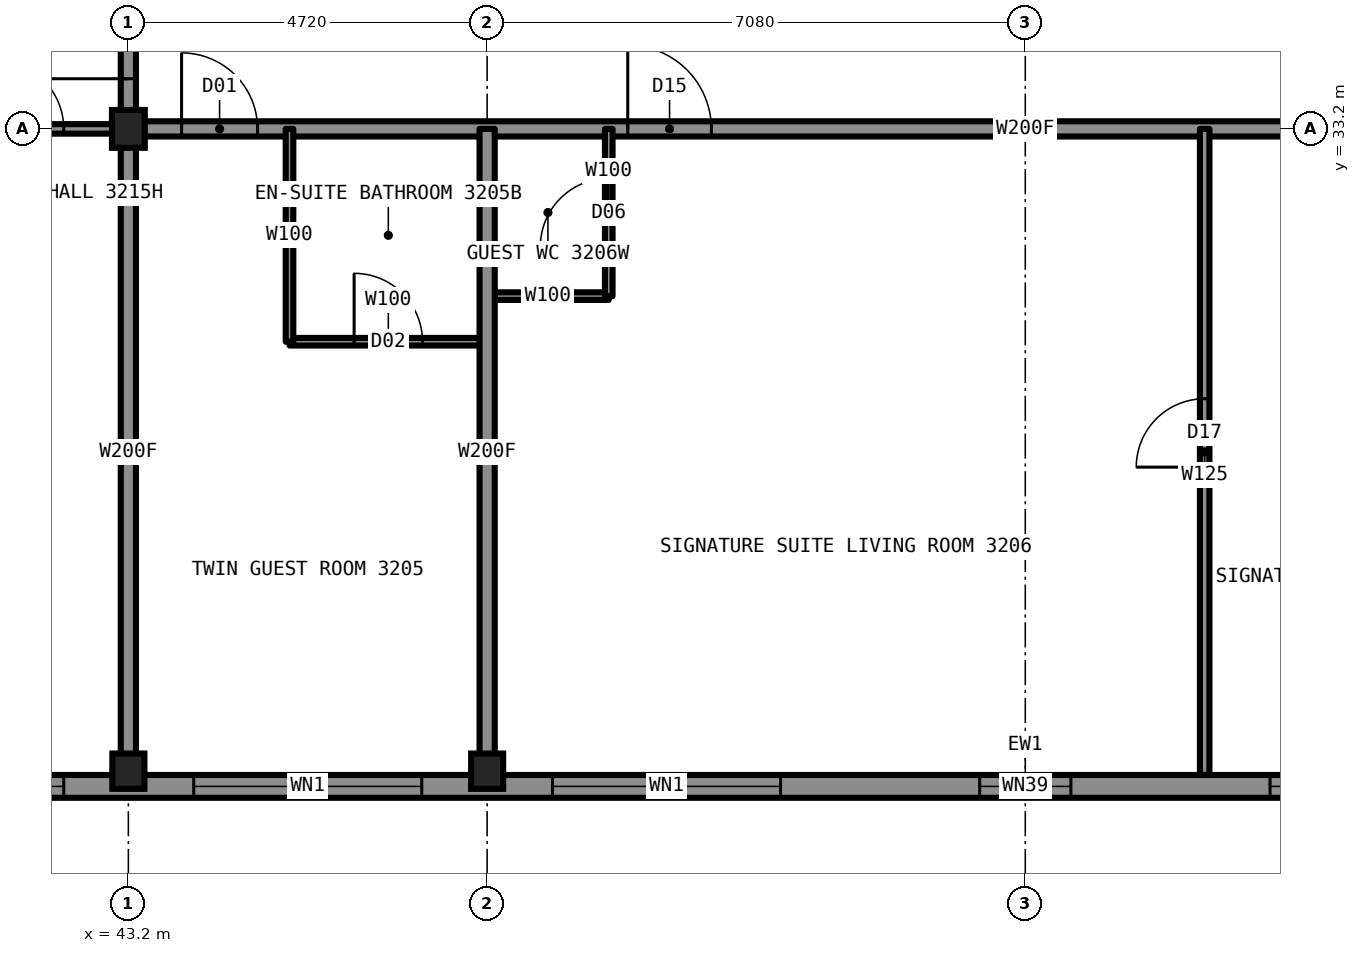
"""IFC4 building model, lengths in metres.
Left out: names, types, materials, properties, quantities, classifications, styles, units other than length and angle.
Written with IfcOpenShell. Run it as: python <this file> out.ifc"""

import sys

from ifc_helpers import new_model, si_unit, direction, frame, frame_2d, origin, origin_2d, place, context, subcontext, project, spatial, rectangle, i_section, extrude, element, fill, save


model = new_model("IFC4")
c1 = context("Model", 3, precision=1e-05, world=origin(), true_north=direction((0.0, 1.0)))
c2 = subcontext(c1, "Body", "Model", "MODEL_VIEW")
j1 = project(units=[si_unit("LENGTHUNIT", "METRE"), si_unit("PLANEANGLEUNIT", "RADIAN")], contexts=[c1])
p1 = place(None, origin())
s1 = spatial("IfcSite", under=j1, at=p1, CompositionType="ELEMENT")
p2 = place(p1, origin())
s2 = spatial("IfcBuilding", under=s1, at=p2, CompositionType="ELEMENT")
p3 = place(p2, frame((0.0, 0.0, 114.4)))
s3 = spatial("IfcBuildingStorey", under=s2, at=p3, CompositionType="ELEMENT", Elevation=114.4)
for number, where, z_axis, x_axis in (
    (1, (43.2, 24.75, 0.0), (0.0, 0.0, 1.0), (1.0, 0.0, 0.0)),
    (2, (47.92, 24.75, 0.0), (0.0, 0.0, 1.0), (1.0, 0.0, 0.0)),
):
    element("IfcColumn", number, at=place(p3, frame(where, z_axis=z_axis, x_axis=x_axis)), inside=s3, PredefinedType="COLUMN", context=c2, shape_type="SweptSolid", body=[
        extrude(i_section(OverallWidth=0.422, OverallDepth=0.465, WebThickness=0.045, FlangeThickness=0.073, at=origin_2d()), origin(), (0.0, 0.0, 1.0), 3.5),
    ])
p4 = place(p3, frame((43.2, 33.2, 0.0), z_axis=(0.0, 0.0, 1.0), x_axis=(1.0, 0.0, 0.0)))
e3 = element("IfcColumn", 3, at=p4, inside=s3, PredefinedType="COLUMN", context=c2, shape_type="SweptSolid", body=[
    extrude(i_section(OverallWidth=0.432, OverallDepth=0.498, WebThickness=0.056, FlangeThickness=0.089, at=origin_2d()), origin(), (0.0, 0.0, 1.0), 3.5),
])
p5 = place(p3, frame((43.2, 33.2, 0.0), z_axis=(0.0, 0.0, 1.0), x_axis=(1.0, 0.0, 0.0)))
e4 = element("IfcWall", 4, at=p5, inside=s3, PredefinedType="PARTITIONING", context=c2, shape_type="SweptSolid", body=[
    extrude(rectangle(XDim=23.6, YDim=0.2, at=frame_2d((11.8, 0.0))), origin(), (0.0, 0.0, 1.0), 3.33),
])
p6 = place(p5, frame((0.7, 0.0, 0.0)))
e5 = element("IfcOpeningElement", 5, at=p6, cuts=e4, PredefinedType="OPENING", context=c2, shape_type="SweptSolid", body=[
    extrude(rectangle(XDim=1.0, YDim=2.2, at=frame_2d((0.5, 1.1))), frame((0.0, 0.11, 0.0), z_axis=(0.0, -1.0, 0.0), x_axis=(1.0, 0.0, 0.0)), (0.0, 0.0, 1.0), 0.22),
])
p7 = place(p5, frame((6.57, 0.0, 0.0)))
e6 = element("IfcOpeningElement", 6, at=p7, cuts=e4, PredefinedType="OPENING", context=c2, shape_type="SweptSolid", body=[
    extrude(rectangle(XDim=1.1, YDim=2.2, at=frame_2d((0.55, 1.1))), frame((0.0, 0.11, 0.0), z_axis=(0.0, -1.0, 0.0), x_axis=(1.0, 0.0, 0.0)), (0.0, 0.0, 1.0), 0.22),
])
p8 = place(p5, frame((20.34, 0.0, 0.0)))
e7 = element("IfcOpeningElement", 7, at=p8, cuts=e4, PredefinedType="OPENING", context=c2, shape_type="SweptSolid", body=[
    extrude(rectangle(XDim=1.0, YDim=2.2, at=frame_2d((0.5, 1.1))), frame((0.0, 0.11, 0.0), z_axis=(0.0, -1.0, 0.0), x_axis=(1.0, 0.0, 0.0)), (0.0, 0.0, 1.0), 0.22),
])
p9 = place(p3, frame((34.7, 33.2, 0.0), z_axis=(0.0, 0.0, 1.0), x_axis=(1.0, 0.0, 0.0)))
e8 = element("IfcWall", 8, at=p9, inside=s3, PredefinedType="PARTITIONING", context=c2, shape_type="SweptSolid", body=[
    extrude(rectangle(XDim=8.5, YDim=0.125, at=frame_2d((4.25, 0.0))), origin(), (0.0, 0.0, 1.0), 2.573),
])
p10 = place(p9, frame((6.75, 0.0, 0.0)))
e9 = element("IfcOpeningElement", 9, at=p10, cuts=e8, PredefinedType="OPENING", context=c2, shape_type="SweptSolid", body=[
    extrude(rectangle(XDim=0.9, YDim=2.2, at=frame_2d((0.45, 1.1))), frame((0.0, 0.073, 0.0), z_axis=(0.0, -1.0, 0.0), x_axis=(1.0, 0.0, 0.0)), (0.0, 0.0, 1.0), 0.145),
])
p11 = place(p3, frame((47.92, 31.0, 0.0), z_axis=(0.0, 0.0, 1.0), x_axis=(1.0, 0.0, 0.0)))
e10 = element("IfcWall", 10, at=p11, inside=s3, PredefinedType="PARTITIONING", context=c2, shape_type="SweptSolid", body=[
    extrude(rectangle(XDim=1.6, YDim=0.1, at=frame_2d((0.8, 0.0))), origin(), (0.0, 0.0, 1.0), 3.33),
])
p12 = place(p3, frame((45.32, 30.4, 0.0), z_axis=(0.0, 0.0, 1.0), x_axis=(1.0, 0.0, 0.0)))
e11 = element("IfcWall", 11, at=p12, inside=s3, PredefinedType="PARTITIONING", context=c2, shape_type="SweptSolid", body=[
    extrude(rectangle(XDim=2.6, YDim=0.1, at=frame_2d((1.3, 0.0))), origin(), (0.0, 0.0, 1.0), 3.33),
])
p13 = place(p12, frame((0.85, 0.0, 0.0)))
e12 = element("IfcOpeningElement", 12, at=p13, cuts=e11, PredefinedType="OPENING", context=c2, shape_type="SweptSolid", body=[
    extrude(rectangle(XDim=0.9, YDim=2.1, at=frame_2d((0.45, 1.05))), frame((0.0, 0.06, 0.0), z_axis=(0.0, -1.0, 0.0), x_axis=(1.0, 0.0, 0.0)), (0.0, 0.0, 1.0), 0.12),
])
p14 = place(p3, frame((43.2, 33.2, 0.0), z_axis=(0.0, 0.0, 1.0), x_axis=(0.0, 1.0, 0.0)))
e13 = element("IfcWall", 13, at=p14, inside=s3, PredefinedType="PARTITIONING", context=c2, shape_type="SweptSolid", body=[
    extrude(rectangle(XDim=4.72, YDim=0.2, at=frame_2d((2.36, 0.0))), origin(), (0.0, 0.0, 1.0), 3.33),
])
p15 = place(p14, frame((0.66, 0.0, 0.0)))
e14 = element("IfcOpeningElement", 14, at=p15, cuts=e13, PredefinedType="OPENING", context=c2, shape_type="SweptSolid", body=[
    extrude(rectangle(XDim=1.1, YDim=2.2, at=frame_2d((0.55, 1.1))), frame((0.0, 0.11, 0.0), z_axis=(0.0, -1.0, 0.0), x_axis=(1.0, 0.0, 0.0)), (0.0, 0.0, 1.0), 0.22),
])
p16 = place(p3, frame((43.2, 24.7, 0.0), z_axis=(0.0, 0.0, 1.0), x_axis=(0.0, 1.0, 0.0)))
e15 = element("IfcWall", 15, at=p16, inside=s3, PredefinedType="PARTITIONING", context=c2, shape_type="SweptSolid", body=[
    extrude(rectangle(XDim=8.5, YDim=0.2, at=frame_2d((4.25, 0.0))), origin(), (0.0, 0.0, 1.0), 2.573),
])
p17 = place(p3, frame((49.52, 31.0, 0.0), z_axis=(0.0, 0.0, 1.0), x_axis=(0.0, 1.0, 0.0)))
e16 = element("IfcWall", 16, at=p17, inside=s3, PredefinedType="PARTITIONING", context=c2, shape_type="SweptSolid", body=[
    extrude(rectangle(XDim=2.2, YDim=0.1, at=frame_2d((1.1, 0.0))), origin(), (0.0, 0.0, 1.0), 3.33),
])
p18 = place(p17, frame((0.65, 0.0, 0.0)))
e17 = element("IfcOpeningElement", 17, at=p18, cuts=e16, PredefinedType="OPENING", context=c2, shape_type="SweptSolid", body=[
    extrude(rectangle(XDim=0.9, YDim=2.1, at=frame_2d((0.45, 1.05))), frame((0.0, 0.06, 0.0), z_axis=(0.0, -1.0, 0.0), x_axis=(1.0, 0.0, 0.0)), (0.0, 0.0, 1.0), 0.12),
])
p19 = place(p3, frame((47.92, 24.7, 0.0), z_axis=(0.0, 0.0, 1.0), x_axis=(0.0, 1.0, 0.0)))
e18 = element("IfcWall", 18, at=p19, inside=s3, PredefinedType="PARTITIONING", context=c2, shape_type="SweptSolid", body=[
    extrude(rectangle(XDim=8.5, YDim=0.2, at=frame_2d((4.25, 0.0))), origin(), (0.0, 0.0, 1.0), 2.573),
])
p20 = place(p3, frame((45.32, 30.4, 0.0), z_axis=(0.0, 0.0, 1.0), x_axis=(0.0, 1.0, 0.0)))
e19 = element("IfcWall", 19, at=p20, inside=s3, PredefinedType="PARTITIONING", context=c2, shape_type="SweptSolid", body=[
    extrude(rectangle(XDim=2.8, YDim=0.1, at=frame_2d((1.4, 0.0))), origin(), (0.0, 0.0, 1.0), 3.33),
])
p21 = place(p3, frame((57.36, 24.7, 0.0), z_axis=(0.0, 0.0, 1.0), x_axis=(0.0, 1.0, 0.0)))
e20 = element("IfcWall", 20, at=p21, inside=s3, PredefinedType="PARTITIONING", context=c2, shape_type="SweptSolid", body=[
    extrude(rectangle(XDim=8.5, YDim=0.125, at=frame_2d((4.25, 0.0))), origin(), (0.0, 0.0, 1.0), 3.33),
])
p22 = place(p21, frame((4.05, 0.0, 0.0)))
e21 = element("IfcOpeningElement", 21, at=p22, cuts=e20, PredefinedType="OPENING", context=c2, shape_type="SweptSolid", body=[
    extrude(rectangle(XDim=0.9, YDim=2.2, at=frame_2d((0.45, 1.1))), frame((0.0, 0.073, 0.0), z_axis=(0.0, -1.0, 0.0), x_axis=(1.0, 0.0, 0.0)), (0.0, 0.0, 1.0), 0.145),
])
p23 = place(p3, frame((39.9, 24.55, 0.0), z_axis=(0.0, 0.0, 1.0), x_axis=(1.0, 0.0, 0.0)))
e22 = element("IfcWall", 22, at=p23, inside=s3, PredefinedType="SOLIDWALL", context=c2, shape_type="SweptSolid", body=[
    extrude(rectangle(XDim=30.2, YDim=0.3, at=frame_2d((15.1, 0.0))), origin(), (0.0, 0.0, 1.0), 2.83),
])
p24 = place(p23, frame((0.85, 0.0, 0.5)))
e23 = element("IfcOpeningElement", 23, at=p24, cuts=e22, PredefinedType="OPENING", context=c2, shape_type="SweptSolid", body=[
    extrude(rectangle(XDim=1.6, YDim=2.0, at=frame_2d((0.8, 1.0))), frame((0.0, 0.16, 0.0), z_axis=(0.0, -1.0, 0.0), x_axis=(1.0, 0.0, 0.0)), (0.0, 0.0, 1.0), 0.32),
])
p25 = place(p23, frame((4.16, 0.0, 0.5)))
e24 = element("IfcOpeningElement", 24, at=p25, cuts=e22, PredefinedType="OPENING", context=c2, shape_type="SweptSolid", body=[
    extrude(rectangle(XDim=3.0, YDim=2.0, at=frame_2d((1.5, 1.0))), frame((0.0, 0.16, 0.0), z_axis=(0.0, -1.0, 0.0), x_axis=(1.0, 0.0, 0.0)), (0.0, 0.0, 1.0), 0.32),
])
p26 = place(p23, frame((10.53, 0.0, 0.5)))
e25 = element("IfcOpeningElement", 25, at=p26, cuts=e22, PredefinedType="OPENING", context=c2, shape_type="SweptSolid", body=[
    extrude(rectangle(XDim=1.3, YDim=1.9, at=frame_2d((0.65, 0.95))), frame((0.0, 0.16, 0.0), z_axis=(0.0, -1.0, 0.0), x_axis=(1.0, 0.0, 0.0)), (0.0, 0.0, 1.0), 0.32),
])
p27 = place(p23, frame((13.6, 0.0, 0.5)))
e26 = element("IfcOpeningElement", 26, at=p27, cuts=e22, PredefinedType="OPENING", context=c2, shape_type="SweptSolid", body=[
    extrude(rectangle(XDim=3.0, YDim=2.0, at=frame_2d((1.5, 1.0))), frame((0.0, 0.16, 0.0), z_axis=(0.0, -1.0, 0.0), x_axis=(1.0, 0.0, 0.0)), (0.0, 0.0, 1.0), 0.32),
])
p28 = place(p23, frame((18.32, 0.0, 0.5)))
e27 = element("IfcOpeningElement", 27, at=p28, cuts=e22, PredefinedType="OPENING", context=c2, shape_type="SweptSolid", body=[
    extrude(rectangle(XDim=1.3, YDim=1.9, at=frame_2d((0.65, 0.95))), frame((0.0, 0.16, 0.0), z_axis=(0.0, -1.0, 0.0), x_axis=(1.0, 0.0, 0.0)), (0.0, 0.0, 1.0), 0.32),
])
p29 = place(p23, frame((23.04, 0.0, 0.5)))
e28 = element("IfcOpeningElement", 28, at=p29, cuts=e22, PredefinedType="OPENING", context=c2, shape_type="SweptSolid", body=[
    extrude(rectangle(XDim=3.0, YDim=2.0, at=frame_2d((1.5, 1.0))), frame((0.0, 0.16, 0.0), z_axis=(0.0, -1.0, 0.0), x_axis=(1.0, 0.0, 0.0)), (0.0, 0.0, 1.0), 0.32),
])
p30 = place(p23, frame((27.75, 0.0, 0.5)))
e29 = element("IfcOpeningElement", 29, at=p30, cuts=e22, PredefinedType="OPENING", context=c2, shape_type="SweptSolid", body=[
    extrude(rectangle(XDim=1.6, YDim=2.0, at=frame_2d((0.8, 1.0))), frame((0.0, 0.16, 0.0), z_axis=(0.0, -1.0, 0.0), x_axis=(1.0, 0.0, 0.0)), (0.0, 0.0, 1.0), 0.32),
])
p31 = place(p23, frame((9.88, 0.0, 0.5)))
e30 = element("IfcOpeningElement", 30, at=p31, cuts=e22, PredefinedType="OPENING", context=c2, shape_type="SweptSolid", body=[
    extrude(rectangle(XDim=0.6, YDim=0.9, at=frame_2d((0.3, 0.45))), frame((0.0, 0.16, 0.0), z_axis=(0.0, -1.0, 0.0), x_axis=(1.0, 0.0, 0.0)), (0.0, 0.0, 1.0), 0.32),
])
p32 = place(p23, frame((19.67, 0.0, 0.5)))
e31 = element("IfcOpeningElement", 31, at=p32, cuts=e22, PredefinedType="OPENING", context=c2, shape_type="SweptSolid", body=[
    extrude(rectangle(XDim=0.6, YDim=0.9, at=frame_2d((0.3, 0.45))), frame((0.0, 0.16, 0.0), z_axis=(0.0, -1.0, 0.0), x_axis=(1.0, 0.0, 0.0)), (0.0, 0.0, 1.0), 0.32),
])
p33 = place(p6, origin())
e32 = element("IfcDoor", 32, at=p33, inside=s3, OperationType="SINGLE_SWING_LEFT", PredefinedType="DOOR", context=c2, shape_type="SweptSolid", body=[
    extrude(rectangle(XDim=1.0, YDim=2.2, at=frame_2d((0.5, 1.1))), frame((0.0, 0.025, 0.0), z_axis=(0.0, -1.0, 0.0), x_axis=(1.0, 0.0, 0.0)), (0.0, 0.0, 1.0), 0.05),
])
fill(e5, e32)
p34 = place(p13, origin())
e33 = element("IfcDoor", 33, at=p34, inside=s3, OperationType="SINGLE_SWING_RIGHT", PredefinedType="DOOR", context=c2, shape_type="SweptSolid", body=[
    extrude(rectangle(XDim=0.9, YDim=2.1, at=frame_2d((0.45, 1.05))), frame((0.0, 0.025, 0.0), z_axis=(0.0, -1.0, 0.0), x_axis=(1.0, 0.0, 0.0)), (0.0, 0.0, 1.0), 0.05),
])
fill(e12, e33)
p35 = place(p7, origin())
e34 = element("IfcDoor", 34, at=p35, inside=s3, OperationType="SINGLE_SWING_LEFT", PredefinedType="DOOR", context=c2, shape_type="SweptSolid", body=[
    extrude(rectangle(XDim=1.1, YDim=2.2, at=frame_2d((0.55, 1.1))), frame((0.0, 0.025, 0.0), z_axis=(0.0, -1.0, 0.0), x_axis=(1.0, 0.0, 0.0)), (0.0, 0.0, 1.0), 0.05),
])
fill(e6, e34)
p36 = place(p22, origin())
e35 = element("IfcDoor", 35, at=p36, inside=s3, OperationType="SINGLE_SWING_LEFT", PredefinedType="DOOR", context=c2, shape_type="SweptSolid", body=[
    extrude(rectangle(XDim=0.9, YDim=2.2, at=frame_2d((0.45, 1.1))), frame((0.0, 0.025, 0.0), z_axis=(0.0, -1.0, 0.0), x_axis=(1.0, 0.0, 0.0)), (0.0, 0.0, 1.0), 0.05),
])
fill(e21, e35)
p37 = place(p18, origin())
e36 = element("IfcDoor", 36, at=p37, inside=s3, OperationType="SINGLE_SWING_LEFT", PredefinedType="DOOR", context=c2, shape_type="SweptSolid", body=[
    extrude(rectangle(XDim=0.9, YDim=2.1, at=frame_2d((0.45, 1.05))), frame((0.0, 0.025, 0.0), z_axis=(0.0, -1.0, 0.0), x_axis=(1.0, 0.0, 0.0)), (0.0, 0.0, 1.0), 0.05),
])
fill(e17, e36)
p38 = place(p10, origin())
e37 = element("IfcDoor", 37, at=p38, inside=s3, OperationType="SINGLE_SWING_LEFT", PredefinedType="DOOR", context=c2, shape_type="SweptSolid", body=[
    extrude(rectangle(XDim=0.9, YDim=2.2, at=frame_2d((0.45, 1.1))), frame((0.0, 0.025, 0.0), z_axis=(0.0, -1.0, 0.0), x_axis=(1.0, 0.0, 0.0)), (0.0, 0.0, 1.0), 0.05),
])
fill(e9, e37)
p39 = place(p15, origin())
e38 = element("IfcDoor", 38, at=p39, inside=s3, OperationType="SINGLE_SWING_LEFT", PredefinedType="DOOR", context=c2, shape_type="SweptSolid", body=[
    extrude(rectangle(XDim=1.1, YDim=2.2, at=frame_2d((0.55, 1.1))), frame((0.0, 0.025, 0.0), z_axis=(0.0, -1.0, 0.0), x_axis=(1.0, 0.0, 0.0)), (0.0, 0.0, 1.0), 0.05),
])
fill(e14, e38)
p40 = place(p24, origin())
e39 = element("IfcWindow", 39, at=p40, inside=s3, PartitioningType="SINGLE_PANEL", PredefinedType="WINDOW", context=c2, shape_type="SweptSolid", body=[
    extrude(rectangle(XDim=1.6, YDim=2.0, at=frame_2d((0.8, 1.0))), frame((0.0, 0.03, 0.0), z_axis=(0.0, -1.0, 0.0), x_axis=(1.0, 0.0, 0.0)), (0.0, 0.0, 1.0), 0.06),
])
fill(e23, e39)
p41 = place(p25, origin())
e40 = element("IfcWindow", 40, at=p41, inside=s3, PartitioningType="SINGLE_PANEL", PredefinedType="WINDOW", context=c2, shape_type="SweptSolid", body=[
    extrude(rectangle(XDim=3.0, YDim=2.0, at=frame_2d((1.5, 1.0))), frame((0.0, 0.03, 0.0), z_axis=(0.0, -1.0, 0.0), x_axis=(1.0, 0.0, 0.0)), (0.0, 0.0, 1.0), 0.06),
])
fill(e24, e40)
p42 = place(p26, origin())
e41 = element("IfcWindow", 41, at=p42, inside=s3, PartitioningType="SINGLE_PANEL", PredefinedType="WINDOW", context=c2, shape_type="SweptSolid", body=[
    extrude(rectangle(XDim=1.3, YDim=1.9, at=frame_2d((0.65, 0.95))), frame((0.0, 0.03, 0.0), z_axis=(0.0, -1.0, 0.0), x_axis=(1.0, 0.0, 0.0)), (0.0, 0.0, 1.0), 0.06),
])
fill(e25, e41)
p43 = place(p27, origin())
e42 = element("IfcWindow", 42, at=p43, inside=s3, PartitioningType="SINGLE_PANEL", PredefinedType="WINDOW", context=c2, shape_type="SweptSolid", body=[
    extrude(rectangle(XDim=3.0, YDim=2.0, at=frame_2d((1.5, 1.0))), frame((0.0, 0.03, 0.0), z_axis=(0.0, -1.0, 0.0), x_axis=(1.0, 0.0, 0.0)), (0.0, 0.0, 1.0), 0.06),
])
fill(e26, e42)
p44 = place(p28, origin())
e43 = element("IfcWindow", 43, at=p44, inside=s3, PartitioningType="SINGLE_PANEL", PredefinedType="WINDOW", context=c2, shape_type="SweptSolid", body=[
    extrude(rectangle(XDim=1.3, YDim=1.9, at=frame_2d((0.65, 0.95))), frame((0.0, 0.03, 0.0), z_axis=(0.0, -1.0, 0.0), x_axis=(1.0, 0.0, 0.0)), (0.0, 0.0, 1.0), 0.06),
])
fill(e27, e43)
p45 = place(p31, origin())
e44 = element("IfcWindow", 44, at=p45, inside=s3, PartitioningType="SINGLE_PANEL", PredefinedType="WINDOW", context=c2, shape_type="SweptSolid", body=[
    extrude(rectangle(XDim=0.6, YDim=0.9, at=frame_2d((0.3, 0.45))), frame((0.0, 0.03, 0.0), z_axis=(0.0, -1.0, 0.0), x_axis=(1.0, 0.0, 0.0)), (0.0, 0.0, 1.0), 0.06),
])
fill(e30, e44)
save(model, sys.argv[1])
